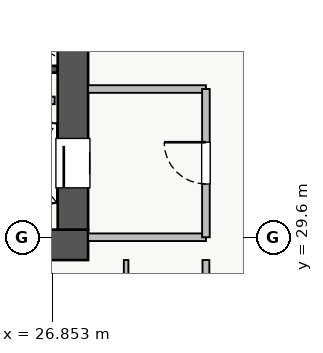
"""IFC4 building model, lengths in metres.
Left out: names, types, materials, properties, quantities, classifications, styles, units other than length and angle.
Written with IfcOpenShell. Run it as: python <this file> out.ifc"""

import sys

from ifc_helpers import new_model, si_unit, direction, frame, frame_2d, origin, place, context, subcontext, project, spatial, rectangle, extrude, source, transform, mapped, element, fill, save


model = new_model("IFC4")
c1 = context("Model", 3, precision=1e-05, world=origin(), true_north=direction((0.0, 1.0)))
c2 = subcontext(c1, "Body", "Model", "MODEL_VIEW")
j1 = project(units=[si_unit("LENGTHUNIT", "METRE"), si_unit("PLANEANGLEUNIT", "RADIAN")], contexts=[c1])
p1 = place(None, origin())
s1 = spatial("IfcSite", under=j1, at=p1, CompositionType="ELEMENT")
p2 = place(p1, origin())
s2 = spatial("IfcBuilding", under=s1, at=p2, CompositionType="ELEMENT")
p3 = place(p2, frame((0.0, 0.0, 23.0)))
s3 = spatial("IfcBuildingStorey", under=s2, at=p3, CompositionType="ELEMENT", Elevation=23.0)
p4 = place(p3, frame((25.8, 34.02, 0.0), z_axis=(0.0, 0.0, 1.0), x_axis=(1.0, 0.0, 0.0)))
e1 = element("IfcWall", 1, at=p4, inside=s3, PredefinedType="SHEAR", context=c2, shape_type="SweptSolid", body=[
    extrude(rectangle(XDim=1.2, YDim=0.18, at=frame_2d((0.6, 0.0))), origin(), (0.0, 0.0, 1.0), 3.07),
])
p5 = place(p3, frame((10.2, 29.4, 0.0), z_axis=(0.0, 0.0, 1.0), x_axis=(1.0, 0.0, 0.0)))
e2 = element("IfcWall", 2, at=p5, inside=s3, PredefinedType="SHEAR", context=c2, shape_type="SweptSolid", body=[
    extrude(rectangle(XDim=17.6, YDim=0.8, at=frame_2d((8.8, 0.0))), origin(), (0.0, 0.0, 1.0), 3.25),
])
p6 = place(p3, frame((27.4, 29.8, 0.0), z_axis=(0.0, 0.0, 1.0), x_axis=(0.0, 1.0, 0.0)))
e3 = element("IfcWall", 3, at=p6, inside=s3, PredefinedType="SHEAR", context=c2, shape_type="SweptSolid", body=[
    extrude(rectangle(XDim=5.6, YDim=0.8, at=frame_2d((2.8, 0.0))), origin(), (0.0, 0.0, 1.0), 3.25),
])
p7 = place(p6, frame((1.1, 0.0, 0.0)))
e4 = element("IfcOpeningElement", 4, at=p7, cuts=e3, PredefinedType="OPENING", context=c2, shape_type="SweptSolid", body=[
    extrude(rectangle(XDim=1.3, YDim=2.05, at=frame_2d((0.65, 1.025))), frame((0.0, 0.41, 0.0), z_axis=(0.0, -1.0, 0.0), x_axis=(1.0, 0.0, 0.0)), (0.0, 0.0, 1.0), 0.82),
])
for number, where, z_axis, x_axis in (
    (5, (27.8, 29.6, 0.0), (0.0, 0.0, 1.0), (1.0, 0.0, 0.0)),
    (6, (27.8, 33.5, 0.0), (0.0, 0.0, 1.0), (1.0, 0.0, 0.0)),
):
    element("IfcWall", number, at=place(p3, frame(where, z_axis=z_axis, x_axis=x_axis)), inside=s3, PredefinedType="PARTITIONING", context=c2, shape_type="SweptSolid", body=[
        extrude(rectangle(XDim=3.1, YDim=0.2, at=frame_2d((1.55, 0.0))), origin(), (0.0, 0.0, 1.0), 3.07),
    ])
p8 = place(p3, frame((30.9, 29.6, 0.0), z_axis=(0.0, 0.0, 1.0), x_axis=(0.0, 1.0, 0.0)))
e7 = element("IfcWall", 7, at=p8, inside=s3, PredefinedType="PARTITIONING", context=c2, shape_type="SweptSolid", body=[
    extrude(rectangle(XDim=3.9, YDim=0.2, at=frame_2d((1.95, 0.0))), origin(), (0.0, 0.0, 1.0), 3.07),
])
p9 = place(p8, frame((1.4, 0.0, 0.0)))
e8 = element("IfcOpeningElement", 8, at=p9, cuts=e7, PredefinedType="OPENING", context=c2, shape_type="SweptSolid", body=[
    extrude(rectangle(XDim=1.1, YDim=2.05, at=frame_2d((0.55, 1.025))), frame((0.0, 0.11, 0.0), z_axis=(0.0, -1.0, 0.0), x_axis=(1.0, 0.0, 0.0)), (0.0, 0.0, 1.0), 0.22),
])
p10 = place(p3, frame((21.75, 33.2, 0.0), z_axis=(0.0, 0.0, 1.0), x_axis=(1.0, 0.0, 0.0)))
e9 = element("IfcWall", 9, at=p10, inside=s3, PredefinedType="PARTITIONING", context=c2, shape_type="SweptSolid", body=[
    extrude(rectangle(XDim=5.17, YDim=0.2, at=frame_2d((2.585, 0.0))), origin(), (0.0, 0.0, 1.0), 3.07),
])
p11 = place(p3, frame((28.8, 26.11, 0.0), z_axis=(0.0, 0.0, 1.0), x_axis=(0.0, 1.0, 0.0)))
e10 = element("IfcWall", 10, at=p11, inside=s3, PredefinedType="PLUMBINGWALL", context=c2, shape_type="SweptSolid", body=[
    extrude(rectangle(XDim=2.89, YDim=0.12, at=frame_2d((1.445, 0.0))), origin(), (0.0, 0.0, 1.0), 3.07),
])
p12 = place(p3, frame((30.9, 17.0, 0.0), z_axis=(0.0, 0.0, 1.0), x_axis=(0.0, 1.0, 0.0)))
e11 = element("IfcWall", 11, at=p12, inside=s3, PredefinedType="PARTITIONING", context=c2, shape_type="SweptSolid", body=[
    extrude(rectangle(XDim=12.0, YDim=0.18, at=frame_2d((6.0, 0.0))), origin(), (0.0, 0.0, 1.0), 3.07),
])
p13 = place(p12, frame((0.855, 0.0, 0.0)))
e12 = element("IfcOpeningElement", 12, at=p13, cuts=e11, PredefinedType="OPENING", context=c2, shape_type="SweptSolid", body=[
    extrude(rectangle(XDim=1.0, YDim=2.05, at=frame_2d((0.5, 1.025))), frame((0.0, 0.1, 0.0), z_axis=(0.0, -1.0, 0.0), x_axis=(1.0, 0.0, 0.0)), (0.0, 0.0, 1.0), 0.2),
])
p14 = place(p12, frame((6.725, 0.0, 0.0)))
e13 = element("IfcOpeningElement", 13, at=p14, cuts=e11, PredefinedType="OPENING", context=c2, shape_type="SweptSolid", body=[
    extrude(rectangle(XDim=1.0, YDim=2.05, at=frame_2d((0.5, 1.025))), frame((0.0, 0.1, 0.0), z_axis=(0.0, -1.0, 0.0), x_axis=(1.0, 0.0, 0.0)), (0.0, 0.0, 1.0), 0.2),
])
m1 = source(origin(), c2, "Body", "SweptSolid", [
    extrude(rectangle(XDim=1.3, YDim=2.05, at=frame_2d((0.65, 1.025))), frame((0.0, 0.025, 0.0), z_axis=(0.0, -1.0, 0.0), x_axis=(1.0, 0.0, 0.0)), (0.0, 0.0, 1.0), 0.05),
])
p15 = place(p7, origin())
e14 = element("IfcDoor", 14, at=p15, inside=s3, OperationType="SLIDING_TO_LEFT", PredefinedType="DOOR", context=c2, shape_type="MappedRepresentation", body=[
    mapped(m1, transform((0.0, 0.0, 0.0), x_axis=(1.0, 0.0, 0.0), y_axis=(0.0, 1.0, 0.0), z_axis=(0.0, 0.0, 1.0), scale=1.0)),
])
fill(e4, e14)
m2 = source(origin(), c2, "Body", "SweptSolid", [
    extrude(rectangle(XDim=1.1, YDim=2.05, at=frame_2d((0.55, 1.025))), frame((0.0, 0.025, 0.0), z_axis=(0.0, -1.0, 0.0), x_axis=(1.0, 0.0, 0.0)), (0.0, 0.0, 1.0), 0.05),
])
p16 = place(p9, origin())
e15 = element("IfcDoor", 15, at=p16, inside=s3, OperationType="SINGLE_SWING_RIGHT", PredefinedType="DOOR", context=c2, shape_type="MappedRepresentation", body=[
    mapped(m2, transform((0.0, 0.0, 0.0), x_axis=(1.0, 0.0, 0.0), y_axis=(0.0, 1.0, 0.0), z_axis=(0.0, 0.0, 1.0), scale=1.0)),
])
fill(e8, e15)
save(model, sys.argv[1])
